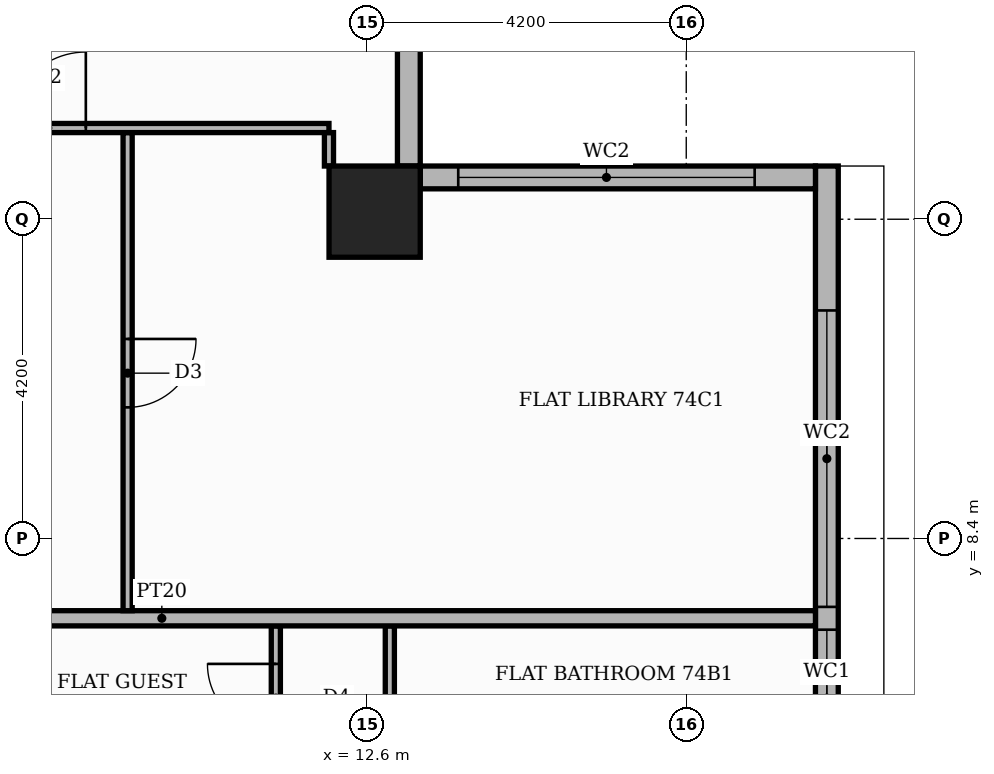
"""IFC4 building model, lengths in metres.
Left out: names, types, materials, properties, quantities, classifications, styles, units other than length and angle.
Written with IfcOpenShell. Run it as: python <this file> out.ifc"""

import sys

from ifc_helpers import new_model, si_unit, direction, frame, frame_2d, origin, origin_2d, place, context, subcontext, project, spatial, rectangle, extrude, element, fill, save


model = new_model("IFC4")
c1 = context("Model", 3, precision=1e-05, world=origin(), true_north=direction((0.0, 1.0)))
c2 = subcontext(c1, "Body", "Model", "MODEL_VIEW")
j1 = project(units=[si_unit("LENGTHUNIT", "METRE"), si_unit("PLANEANGLEUNIT", "RADIAN")], contexts=[c1])
p1 = place(None, origin())
s1 = spatial("IfcSite", under=j1, at=p1, CompositionType="ELEMENT")
p2 = place(p1, origin())
s2 = spatial("IfcBuilding", under=s1, at=p2, CompositionType="ELEMENT")
p3 = place(p2, frame((0.0, 0.0, 308.4)))
s3 = spatial("IfcBuildingStorey", under=s2, at=p3, CompositionType="ELEMENT", Elevation=308.4)
p4 = place(p3, frame((12.7, 12.7, 0.0), z_axis=(0.0, 0.0, 1.0), x_axis=(1.0, 0.0, 0.0)))
e1 = element("IfcColumn", 1, at=p4, inside=s3, PredefinedType="COLUMN", context=c2, shape_type="SweptSolid", body=[
    extrude(rectangle(XDim=1.2, YDim=1.2, at=origin_2d()), origin(), (0.0, 0.0, 1.0), 3.9),
])
p5 = place(p3, frame((18.65, -13.0, 0.0), z_axis=(0.0, 0.0, 1.0), x_axis=(0.0, 1.0, 0.0)))
e2 = element("IfcWall", 2, at=p5, inside=s3, PredefinedType="STANDARD", context=c2, shape_type="SweptSolid", body=[
    extrude(rectangle(XDim=26.3, YDim=0.3, at=frame_2d((13.15, 0.0))), origin(), (0.0, 0.0, 1.0), 3.55),
])
p6 = place(p5, frame((1.6, 0.0, 0.6)))
e3 = element("IfcOpeningElement", 3, at=p6, cuts=e2, PredefinedType="OPENING", context=c2, shape_type="SweptSolid", body=[
    extrude(rectangle(XDim=6.0, YDim=2.4, at=frame_2d((3.0, 1.2))), frame((0.0, 0.16, 0.0), z_axis=(0.0, -1.0, 0.0), x_axis=(1.0, 0.0, 0.0)), (0.0, 0.0, 1.0), 0.32),
])
p7 = place(p5, frame((7.9, 0.0, 0.6)))
e4 = element("IfcOpeningElement", 4, at=p7, cuts=e2, PredefinedType="OPENING", context=c2, shape_type="SweptSolid", body=[
    extrude(rectangle(XDim=3.9, YDim=2.4, at=frame_2d((1.95, 1.2))), frame((0.0, 0.16, 0.0), z_axis=(0.0, -1.0, 0.0), x_axis=(1.0, 0.0, 0.0)), (0.0, 0.0, 1.0), 0.32),
])
p8 = place(p5, frame((14.2, 0.0, 0.6)))
e5 = element("IfcOpeningElement", 5, at=p8, cuts=e2, PredefinedType="OPENING", context=c2, shape_type="SweptSolid", body=[
    extrude(rectangle(XDim=1.8, YDim=2.4, at=frame_2d((0.9, 1.2))), frame((0.0, 0.16, 0.0), z_axis=(0.0, -1.0, 0.0), x_axis=(1.0, 0.0, 0.0)), (0.0, 0.0, 1.0), 0.32),
])
p9 = place(p5, frame((16.3, 0.0, 0.6)))
e6 = element("IfcOpeningElement", 6, at=p9, cuts=e2, PredefinedType="OPENING", context=c2, shape_type="SweptSolid", body=[
    extrude(rectangle(XDim=1.8, YDim=2.4, at=frame_2d((0.9, 1.2))), frame((0.0, 0.16, 0.0), z_axis=(0.0, -1.0, 0.0), x_axis=(1.0, 0.0, 0.0)), (0.0, 0.0, 1.0), 0.32),
])
p10 = place(p5, frame((18.4, 0.0, 0.6)))
e7 = element("IfcOpeningElement", 7, at=p10, cuts=e2, PredefinedType="OPENING", context=c2, shape_type="SweptSolid", body=[
    extrude(rectangle(XDim=1.8, YDim=2.4, at=frame_2d((0.9, 1.2))), frame((0.0, 0.16, 0.0), z_axis=(0.0, -1.0, 0.0), x_axis=(1.0, 0.0, 0.0)), (0.0, 0.0, 1.0), 0.32),
])
p11 = place(p5, frame((20.5, 0.0, 0.6)))
e8 = element("IfcOpeningElement", 8, at=p11, cuts=e2, PredefinedType="OPENING", context=c2, shape_type="SweptSolid", body=[
    extrude(rectangle(XDim=3.9, YDim=2.4, at=frame_2d((1.95, 1.2))), frame((0.0, 0.16, 0.0), z_axis=(0.0, -1.0, 0.0), x_axis=(1.0, 0.0, 0.0)), (0.0, 0.0, 1.0), 0.32),
])
p12 = place(p5, frame((12.175, 0.0, 0.9)))
e9 = element("IfcOpeningElement", 9, at=p12, cuts=e2, PredefinedType="OPENING", context=c2, shape_type="SweptSolid", body=[
    extrude(rectangle(XDim=1.2, YDim=2.1, at=frame_2d((0.6, 1.05))), frame((0.0, 0.16, 0.0), z_axis=(0.0, -1.0, 0.0), x_axis=(1.0, 0.0, 0.0)), (0.0, 0.0, 1.0), 0.32),
])
p13 = place(p3, frame((18.5, 13.15, 0.0), z_axis=(0.0, 0.0, 1.0), x_axis=(-1.0, 0.0, 0.0)))
e10 = element("IfcWall", 10, at=p13, inside=s3, PredefinedType="STANDARD", context=c2, shape_type="SweptSolid", body=[
    extrude(rectangle(XDim=5.2, YDim=0.3, at=frame_2d((2.6, 0.0))), origin(), (0.0, 0.0, 1.0), 3.55),
])
p14 = place(p13, frame((0.8, 0.0, 0.6)))
e11 = element("IfcOpeningElement", 11, at=p14, cuts=e10, PredefinedType="OPENING", context=c2, shape_type="SweptSolid", body=[
    extrude(rectangle(XDim=3.9, YDim=2.4, at=frame_2d((1.95, 1.2))), frame((0.0, 0.16, 0.0), z_axis=(0.0, -1.0, 0.0), x_axis=(1.0, 0.0, 0.0)), (0.0, 0.0, 1.0), 0.32),
])
p15 = place(p3, frame((13.15, 13.3, 0.0), z_axis=(0.0, 0.0, 1.0), x_axis=(0.0, 1.0, 0.0)))
e12 = element("IfcWall", 12, at=p15, inside=s3, PredefinedType="STANDARD", context=c2, shape_type="SweptSolid", body=[
    extrude(rectangle(XDim=5.5, YDim=0.3, at=frame_2d((2.75, 0.0))), origin(), (0.0, 0.0, 1.0), 3.55),
])
p16 = place(p15, frame((2.6, 0.0, 0.6)))
e13 = element("IfcOpeningElement", 13, at=p16, cuts=e12, PredefinedType="OPENING", context=c2, shape_type="SweptSolid", body=[
    extrude(rectangle(XDim=1.8, YDim=2.4, at=frame_2d((0.9, 1.2))), frame((0.0, 0.16, 0.0), z_axis=(0.0, -1.0, 0.0), x_axis=(1.0, 0.0, 0.0)), (0.0, 0.0, 1.0), 0.32),
])
p17 = place(p3, frame((11.4, 5.31, 0.0), z_axis=(0.0, 0.0, 1.0), x_axis=(0.0, 1.0, 0.0)))
e14 = element("IfcWall", 14, at=p17, inside=s3, PredefinedType="PARTITIONING", context=c2, shape_type="SweptSolid", body=[
    extrude(rectangle(XDim=1.94, YDim=0.12, at=frame_2d((0.97, 0.0))), origin(), (0.0, 0.0, 1.0), 3.55),
])
p18 = place(p17, frame((0.54, 0.0, 0.0)))
e15 = element("IfcOpeningElement", 15, at=p18, cuts=e14, PredefinedType="OPENING", context=c2, shape_type="SweptSolid", body=[
    extrude(rectangle(XDim=0.9, YDim=2.1, at=frame_2d((0.45, 1.05))), frame((0.0, 0.07, 0.0), z_axis=(0.0, -1.0, 0.0), x_axis=(1.0, 0.0, 0.0)), (0.0, 0.0, 1.0), 0.14),
])
p19 = place(p3, frame((12.9, 5.31, 0.0), z_axis=(0.0, 0.0, 1.0), x_axis=(0.0, 1.0, 0.0)))
e16 = element("IfcWall", 16, at=p19, inside=s3, PredefinedType="PARTITIONING", context=c2, shape_type="SweptSolid", body=[
    extrude(rectangle(XDim=1.94, YDim=0.12, at=frame_2d((0.97, 0.0))), origin(), (0.0, 0.0, 1.0), 3.55),
])
p20 = place(p3, frame((1.3, 7.35, 0.0), z_axis=(0.0, 0.0, 1.0), x_axis=(1.0, 0.0, 0.0)))
e17 = element("IfcWall", 17, at=p20, inside=s3, PredefinedType="PARTITIONING", context=c2, shape_type="SweptSolid", body=[
    extrude(rectangle(XDim=17.2, YDim=0.2, at=frame_2d((8.6, 0.0))), origin(), (0.0, 0.0, 1.0), 3.55),
])
p21 = place(p20, frame((3.4, 0.0, 0.0)))
e18 = element("IfcOpeningElement", 18, at=p21, cuts=e17, PredefinedType="OPENING", context=c2, shape_type="SweptSolid", body=[
    extrude(rectangle(XDim=1.1, YDim=2.4, at=frame_2d((0.55, 1.2))), frame((0.0, 0.11, 0.0), z_axis=(0.0, -1.0, 0.0), x_axis=(1.0, 0.0, 0.0)), (0.0, 0.0, 1.0), 0.22),
])
p22 = place(p3, frame((9.45, 7.45, 0.0), z_axis=(0.0, 0.0, 1.0), x_axis=(0.0, 1.0, 0.0)))
e19 = element("IfcWall", 19, at=p22, inside=s3, PredefinedType="PARTITIONING", context=c2, shape_type="SweptSolid", body=[
    extrude(rectangle(XDim=6.29, YDim=0.12, at=frame_2d((3.145, 0.0))), origin(), (0.0, 0.0, 1.0), 3.55),
])
p23 = place(p22, frame((2.675, 0.0, 0.0)))
e20 = element("IfcOpeningElement", 20, at=p23, cuts=e19, PredefinedType="OPENING", context=c2, shape_type="SweptSolid", body=[
    extrude(rectangle(XDim=0.9, YDim=2.1, at=frame_2d((0.45, 1.05))), frame((0.0, 0.07, 0.0), z_axis=(0.0, -1.0, 0.0), x_axis=(1.0, 0.0, 0.0)), (0.0, 0.0, 1.0), 0.14),
])
p24 = place(p3, frame((12.099, 13.3, 0.0), z_axis=(0.0, 0.0, 1.0), x_axis=(0.0, 1.0, 0.0)))
e21 = element("IfcWall", 21, at=p24, inside=s3, PredefinedType="PARTITIONING", context=c2, shape_type="SweptSolid", body=[
    extrude(rectangle(XDim=0.44, YDim=0.12, at=frame_2d((0.22, 0.0))), origin(), (0.0, 0.0, 1.0), 3.55),
])
p25 = place(p3, frame((-7.25, 13.8, 0.0), z_axis=(0.0, 0.0, 1.0), x_axis=(1.0, 0.0, 0.0)))
e22 = element("IfcWall", 22, at=p25, inside=s3, PredefinedType="PARTITIONING", context=c2, shape_type="SweptSolid", body=[
    extrude(rectangle(XDim=19.349, YDim=0.12, at=frame_2d((9.675, 0.0))), origin(), (0.0, 0.0, 1.0), 3.55),
])
p26 = place(p25, frame((15.15, 0.0, 0.0)))
e23 = element("IfcOpeningElement", 23, at=p26, cuts=e22, PredefinedType="OPENING", context=c2, shape_type="SweptSolid", body=[
    extrude(rectangle(XDim=1.0, YDim=2.1, at=frame_2d((0.5, 1.05))), frame((0.0, 0.07, 0.0), z_axis=(0.0, -1.0, 0.0), x_axis=(1.0, 0.0, 0.0)), (0.0, 0.0, 1.0), 0.14),
])
p27 = place(p25, frame((10.95, 0.0, 0.0)))
e24 = element("IfcOpeningElement", 24, at=p27, cuts=e22, PredefinedType="OPENING", context=c2, shape_type="SweptSolid", body=[
    extrude(rectangle(XDim=1.0, YDim=2.1, at=frame_2d((0.5, 1.05))), frame((0.0, 0.07, 0.0), z_axis=(0.0, -1.0, 0.0), x_axis=(1.0, 0.0, 0.0)), (0.0, 0.0, 1.0), 0.14),
])
p28 = place(p25, frame((5.75, 0.0, 0.0)))
e25 = element("IfcOpeningElement", 25, at=p28, cuts=e22, PredefinedType="OPENING", context=c2, shape_type="SweptSolid", body=[
    extrude(rectangle(XDim=0.9, YDim=2.1, at=frame_2d((0.45, 1.05))), frame((0.0, 0.07, 0.0), z_axis=(0.0, -1.0, 0.0), x_axis=(1.0, 0.0, 0.0)), (0.0, 0.0, 1.0), 0.14),
])
p29 = place(p10, origin())
e26 = element("IfcWindow", 26, at=p29, inside=s3, PartitioningType="SINGLE_PANEL", PredefinedType="WINDOW", context=c2, shape_type="SweptSolid", body=[
    extrude(rectangle(XDim=1.8, YDim=2.4, at=frame_2d((0.9, 1.2))), frame((0.0, 0.03, 0.0), z_axis=(0.0, -1.0, 0.0), x_axis=(1.0, 0.0, 0.0)), (0.0, 0.0, 1.0), 0.06),
])
fill(e7, e26)
p30 = place(p11, origin())
e27 = element("IfcWindow", 27, at=p30, inside=s3, PartitioningType="SINGLE_PANEL", PredefinedType="WINDOW", context=c2, shape_type="SweptSolid", body=[
    extrude(rectangle(XDim=3.9, YDim=2.4, at=frame_2d((1.95, 1.2))), frame((0.0, 0.03, 0.0), z_axis=(0.0, -1.0, 0.0), x_axis=(1.0, 0.0, 0.0)), (0.0, 0.0, 1.0), 0.06),
])
fill(e8, e27)
p31 = place(p14, origin())
e28 = element("IfcWindow", 28, at=p31, inside=s3, PartitioningType="SINGLE_PANEL", PredefinedType="WINDOW", context=c2, shape_type="SweptSolid", body=[
    extrude(rectangle(XDim=3.9, YDim=2.4, at=frame_2d((1.95, 1.2))), frame((0.0, 0.03, 0.0), z_axis=(0.0, -1.0, 0.0), x_axis=(1.0, 0.0, 0.0)), (0.0, 0.0, 1.0), 0.06),
])
fill(e11, e28)
p32 = place(p18, origin())
e29 = element("IfcDoor", 29, at=p32, inside=s3, OperationType="SINGLE_SWING_RIGHT", PredefinedType="DOOR", context=c2, shape_type="SweptSolid", body=[
    extrude(rectangle(XDim=0.9, YDim=2.1, at=frame_2d((0.45, 1.05))), frame((0.0, 0.025, 0.0), z_axis=(0.0, -1.0, 0.0), x_axis=(1.0, 0.0, 0.0)), (0.0, 0.0, 1.0), 0.05),
])
fill(e15, e29)
p33 = place(p23, frame((0.9, 0.0, 0.0), z_axis=(0.0, 0.0, 1.0), x_axis=(-1.0, 0.0, 0.0)))
e30 = element("IfcDoor", 30, at=p33, inside=s3, OperationType="SINGLE_SWING_RIGHT", PredefinedType="DOOR", context=c2, shape_type="SweptSolid", body=[
    extrude(rectangle(XDim=0.9, YDim=2.1, at=frame_2d((0.45, 1.05))), frame((0.0, 0.025, 0.0), z_axis=(0.0, -1.0, 0.0), x_axis=(1.0, 0.0, 0.0)), (0.0, 0.0, 1.0), 0.05),
])
fill(e20, e30)
p34 = place(p26, origin())
e31 = element("IfcDoor", 31, at=p34, inside=s3, OperationType="SINGLE_SWING_RIGHT", PredefinedType="DOOR", context=c2, shape_type="SweptSolid", body=[
    extrude(rectangle(XDim=1.0, YDim=2.1, at=frame_2d((0.5, 1.05))), frame((0.0, 0.025, 0.0), z_axis=(0.0, -1.0, 0.0), x_axis=(1.0, 0.0, 0.0)), (0.0, 0.0, 1.0), 0.05),
])
fill(e23, e31)
save(model, sys.argv[1])
